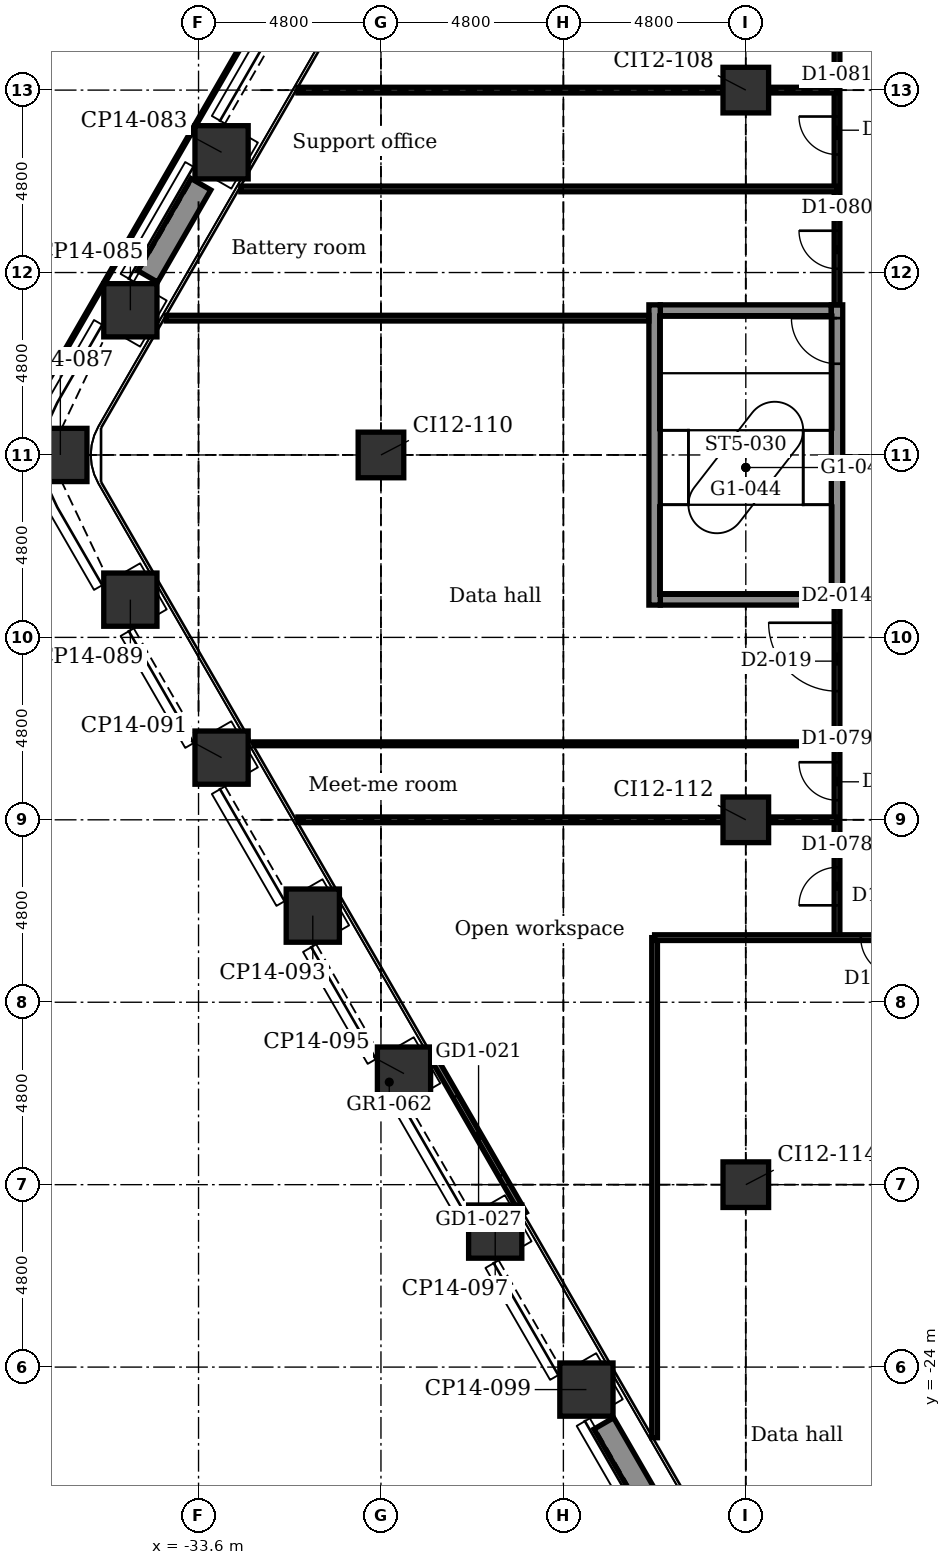
"""IFC4 building model, lengths in metres.
Left out: names, types, materials, properties, quantities, classifications, styles, units other than length and angle.
Written with IfcOpenShell. Run it as: python <this file> out.ifc"""

import sys

from ifc_helpers import new_model, si_unit, direction, frame, frame_2d, origin, origin_2d, place, context, subcontext, project, spatial, rectangle, extrude, element, fill, save


model = new_model("IFC4")
c1 = context("Model", 3, precision=1e-05, world=origin(), true_north=direction((0.0, 1.0)))
c2 = subcontext(c1, "Body", "Model", "MODEL_VIEW")
j1 = project(units=[si_unit("LENGTHUNIT", "METRE"), si_unit("PLANEANGLEUNIT", "RADIAN")], contexts=[c1])
p1 = place(None, origin())
s1 = spatial("IfcSite", under=j1, at=p1, CompositionType="ELEMENT")
p2 = place(p1, origin())
s2 = spatial("IfcBuilding", under=s1, at=p2, CompositionType="ELEMENT")
p3 = place(p2, frame((0.0, 0.0, 22.4)))
s3 = spatial("IfcBuildingStorey", under=s2, at=p3, CompositionType="ELEMENT", Elevation=22.4)
for number, where, z_axis, x_axis in (
    (1, (-23.394, -24.592, -0.25), (0.0, 0.0, 1.0), (0.866, 0.5, 0.0)),
    (2, (-25.794, -20.435, -0.25), (0.0, 0.0, 1.0), (0.866, 0.5, 0.0)),
    (3, (-28.194, -16.278, -0.25), (0.0, 0.0, 1.0), (0.866, 0.5, 0.0)),
    (4, (-30.594, -12.121, -0.25), (0.0, 0.0, 1.0), (0.866, 0.5, 0.0)),
    (5, (-32.994, -7.964, -0.25), (0.0, 0.0, 1.0), (0.866, 0.5, 0.0)),
    (6, (-35.394, -3.807, -0.25), (0.0, 0.0, 1.0), (0.866, 0.5, 0.0)),
    (7, (-37.236, 0.0, -0.25), (0.0, 0.0, 1.0), (1.0, 0.0, 0.0)),
    (8, (-35.394, 3.807, -0.25), (0.0, 0.0, 1.0), (0.5, 0.866, 0.0)),
    (9, (-32.994, 7.964, -0.25), (0.0, 0.0, 1.0), (0.5, 0.866, 0.0)),
):
    element("IfcColumn", number, at=place(p3, frame(where, z_axis=z_axis, x_axis=x_axis)), inside=s3, PredefinedType="COLUMN", context=c2, shape_type="SweptSolid", body=[
        extrude(rectangle(XDim=1.4, YDim=1.4, at=origin_2d()), origin(), (0.0, 0.0, 1.0), 5.5),
    ])
for number, where, z_axis, x_axis in (
    (10, (-28.8, 0.0, -0.25), (0.0, 0.0, 1.0), (1.0, 0.0, 0.0)),
    (11, (-19.2, -19.2, -0.25), (0.0, 0.0, 1.0), (1.0, 0.0, 0.0)),
    (12, (-19.2, -9.6, -0.25), (0.0, 0.0, 1.0), (1.0, 0.0, 0.0)),
    (13, (-19.2, 9.6, -0.25), (0.0, 0.0, 1.0), (1.0, 0.0, 0.0)),
):
    element("IfcColumn", number, at=place(p3, frame(where, z_axis=z_axis, x_axis=x_axis)), inside=s3, PredefinedType="COLUMN", context=c2, shape_type="SweptSolid", body=[
        extrude(rectangle(XDim=1.2, YDim=1.2, at=origin_2d()), origin(), (0.0, 0.0, 1.0), 5.5),
    ])
for number, where, z_axis, x_axis in (
    (14, (-21.45, -3.8, -0.25), (0.0, 0.0, 1.0), (1.0, 0.0, 0.0)),
    (15, (-21.45, 3.8, -0.25), (0.0, 0.0, 1.0), (1.0, 0.0, 0.0)),
):
    element("IfcWall", number, at=place(p3, frame(where, z_axis=z_axis, x_axis=x_axis)), inside=s3, PredefinedType="STANDARD", context=c2, shape_type="SweptSolid", body=[
        extrude(rectangle(XDim=4.5, YDim=0.3, at=frame_2d((2.25, 0.0))), origin(), (0.0, 0.0, 1.0), 5.5),
    ])
p4 = place(p3, frame((-21.6, -3.95, -0.25), z_axis=(0.0, 0.0, 1.0), x_axis=(0.0, 1.0, 0.0)))
e16 = element("IfcWall", 16, at=p4, inside=s3, PredefinedType="STANDARD", context=c2, shape_type="SweptSolid", body=[
    extrude(rectangle(XDim=7.9, YDim=0.3, at=frame_2d((3.95, 0.0))), origin(), (0.0, 0.0, 1.0), 5.5),
])
p5 = place(p3, frame((-16.8, -3.95, -0.25), z_axis=(0.0, 0.0, 1.0), x_axis=(0.0, 1.0, 0.0)))
e17 = element("IfcWall", 17, at=p5, inside=s3, PredefinedType="STANDARD", context=c2, shape_type="SweptSolid", body=[
    extrude(rectangle(XDim=7.9, YDim=0.3, at=frame_2d((3.95, 0.0))), origin(), (0.0, 0.0, 1.0), 5.5),
])
p6 = place(p5, frame((6.35, 0.0, 0.25)))
e18 = element("IfcOpeningElement", 18, at=p6, cuts=e17, PredefinedType="OPENING", context=c2, shape_type="SweptSolid", body=[
    extrude(rectangle(XDim=1.2, YDim=2.1, at=frame_2d((0.6, 1.05))), frame((0.0, 0.16, 0.0), z_axis=(0.0, -1.0, 0.0), x_axis=(1.0, 0.0, 0.0)), (0.0, 0.0, 1.0), 0.32),
])
p7 = place(p3, frame((-25.047, -19.969, 0.0), z_axis=(0.0, 0.0, 1.0), x_axis=(-0.5000167099, 0.866015756104, 0.0)))
e19 = element("IfcWall", 19, at=p7, inside=s3, PredefinedType="PARTITIONING", context=c2, shape_type="SweptSolid", body=[
    extrude(rectangle(XDim=4.74, YDim=0.16, at=frame_2d((2.37, 0.0))), origin(), (0.0, 0.0, 1.0), 5.25),
])
p8 = place(p7, frame((1.17, 0.0, 0.0)))
e20 = element("IfcOpeningElement", 20, at=p8, cuts=e19, PredefinedType="OPENING", context=c2, shape_type="SweptSolid", body=[
    extrude(rectangle(XDim=2.4, YDim=2.4, at=frame_2d((1.2, 1.2))), frame((0.0, 0.09, 0.0), z_axis=(0.0, -1.0, 0.0), x_axis=(1.0, 0.0, 0.0)), (0.0, 0.0, 1.0), 0.18),
])
for number, where, z_axis, x_axis in (
    (21, (-21.537, -27.907, 0.0), (0.0, 0.0, 1.0), (-0.5, 0.866, 0.0)),
    (22, (-34.937, 4.698, 0.0), (0.0, 0.0, 1.0), (0.5, 0.866, 0.0)),
):
    element("IfcWall", number, at=place(p3, frame(where, z_axis=z_axis, x_axis=x_axis)), inside=s3, PredefinedType="USERDEFINED", context=c2, shape_type="SweptSolid", body=[
        extrude(rectangle(XDim=2.8, YDim=0.6, at=frame_2d((1.4, 0.0))), origin(), (0.0, 0.0, 1.0), 0.7),
    ])
p9 = place(p3, frame((-16.8, -12.7, 0.0), z_axis=(0.0, 0.0, 1.0), x_axis=(0.0, 1.0, 0.0)))
e23 = element("IfcWall", 23, at=p9, inside=s3, PredefinedType="PARTITIONING", context=c2, shape_type="SweptSolid", body=[
    extrude(rectangle(XDim=8.75, YDim=0.15, at=frame_2d((4.375, 0.0))), origin(), (0.0, 0.0, 1.0), 5.25),
])
p10 = place(p9, frame((0.85, 0.0, 0.0)))
e24 = element("IfcOpeningElement", 24, at=p10, cuts=e23, PredefinedType="OPENING", context=c2, shape_type="SweptSolid", body=[
    extrude(rectangle(XDim=1.0, YDim=2.1, at=frame_2d((0.5, 1.05))), frame((0.0, 0.085, 0.0), z_axis=(0.0, -1.0, 0.0), x_axis=(1.0, 0.0, 0.0)), (0.0, 0.0, 1.0), 0.17),
])
p11 = place(p9, frame((3.615, 0.0, 0.0)))
e25 = element("IfcOpeningElement", 25, at=p11, cuts=e23, PredefinedType="OPENING", context=c2, shape_type="SweptSolid", body=[
    extrude(rectangle(XDim=1.0, YDim=2.1, at=frame_2d((0.5, 1.05))), frame((0.0, 0.085, 0.0), z_axis=(0.0, -1.0, 0.0), x_axis=(1.0, 0.0, 0.0)), (0.0, 0.0, 1.0), 0.17),
])
p12 = place(p9, frame((6.485, 0.0, 0.0)))
e26 = element("IfcOpeningElement", 26, at=p12, cuts=e23, PredefinedType="OPENING", context=c2, shape_type="SweptSolid", body=[
    extrude(rectangle(XDim=1.8, YDim=2.1, at=frame_2d((0.9, 1.05))), frame((0.0, 0.085, 0.0), z_axis=(0.0, -1.0, 0.0), x_axis=(1.0, 0.0, 0.0)), (0.0, 0.0, 1.0), 0.17),
])
p13 = place(p3, frame((-16.8, 3.95, 0.0), z_axis=(0.0, 0.0, 1.0), x_axis=(0.0, 1.0, 0.0)))
e27 = element("IfcWall", 27, at=p13, inside=s3, PredefinedType="PARTITIONING", context=c2, shape_type="SweptSolid", body=[
    extrude(rectangle(XDim=9.05, YDim=0.15, at=frame_2d((4.525, 0.0))), origin(), (0.0, 0.0, 1.0), 5.25),
])
p14 = place(p13, frame((0.95, 0.0, 0.0)))
e28 = element("IfcOpeningElement", 28, at=p14, cuts=e27, PredefinedType="OPENING", context=c2, shape_type="SweptSolid", body=[
    extrude(rectangle(XDim=1.0, YDim=2.1, at=frame_2d((0.5, 1.05))), frame((0.0, 0.085, 0.0), z_axis=(0.0, -1.0, 0.0), x_axis=(1.0, 0.0, 0.0)), (0.0, 0.0, 1.0), 0.17),
])
p15 = place(p13, frame((3.955, 0.0, 0.0)))
e29 = element("IfcOpeningElement", 29, at=p15, cuts=e27, PredefinedType="OPENING", context=c2, shape_type="SweptSolid", body=[
    extrude(rectangle(XDim=1.0, YDim=2.1, at=frame_2d((0.5, 1.05))), frame((0.0, 0.085, 0.0), z_axis=(0.0, -1.0, 0.0), x_axis=(1.0, 0.0, 0.0)), (0.0, 0.0, 1.0), 0.17),
])
p16 = place(p13, frame((7.05, 0.0, 0.0)))
e30 = element("IfcOpeningElement", 30, at=p16, cuts=e27, PredefinedType="OPENING", context=c2, shape_type="SweptSolid", body=[
    extrude(rectangle(XDim=1.0, YDim=2.1, at=frame_2d((0.5, 1.05))), frame((0.0, 0.085, 0.0), z_axis=(0.0, -1.0, 0.0), x_axis=(1.0, 0.0, 0.0)), (0.0, 0.0, 1.0), 0.17),
])
p17 = place(p3, frame((-21.6, -25.858, 0.0), z_axis=(0.0, 0.0, 1.0), x_axis=(0.0, 1.0, 0.0)))
e31 = element("IfcWall", 31, at=p17, inside=s3, PredefinedType="PARTITIONING", context=c2, shape_type="SweptSolid", body=[
    extrude(rectangle(XDim=13.158, YDim=0.15, at=frame_2d((6.579, 0.0))), origin(), (0.0, 0.0, 1.0), 5.25),
])
p18 = place(p3, frame((-21.6, -12.7, 0.0), z_axis=(0.0, 0.0, 1.0), x_axis=(1.0, 0.0, 0.0)))
e32 = element("IfcWall", 32, at=p18, inside=s3, PredefinedType="PARTITIONING", context=c2, shape_type="SweptSolid", body=[
    extrude(rectangle(XDim=38.4, YDim=0.15, at=frame_2d((19.2, 0.0))), origin(), (0.0, 0.0, 1.0), 5.25),
])
p19 = place(p18, frame((5.425, 0.0, 0.0)))
e33 = element("IfcOpeningElement", 33, at=p19, cuts=e32, PredefinedType="OPENING", context=c2, shape_type="SweptSolid", body=[
    extrude(rectangle(XDim=1.0, YDim=2.1, at=frame_2d((0.5, 1.05))), frame((0.0, 0.085, 0.0), z_axis=(0.0, -1.0, 0.0), x_axis=(1.0, 0.0, 0.0)), (0.0, 0.0, 1.0), 0.17),
])
p20 = place(p18, frame((9.1, 0.0, 0.0)))
e34 = element("IfcOpeningElement", 34, at=p20, cuts=e32, PredefinedType="OPENING", context=c2, shape_type="SweptSolid", body=[
    extrude(rectangle(XDim=1.0, YDim=2.1, at=frame_2d((0.5, 1.05))), frame((0.0, 0.085, 0.0), z_axis=(0.0, -1.0, 0.0), x_axis=(1.0, 0.0, 0.0)), (0.0, 0.0, 1.0), 0.17),
])
p21 = place(p18, frame((15.9, 0.0, 0.0)))
e35 = element("IfcOpeningElement", 35, at=p21, cuts=e32, PredefinedType="OPENING", context=c2, shape_type="SweptSolid", body=[
    extrude(rectangle(XDim=1.8, YDim=2.1, at=frame_2d((0.9, 1.05))), frame((0.0, 0.085, 0.0), z_axis=(0.0, -1.0, 0.0), x_axis=(1.0, 0.0, 0.0)), (0.0, 0.0, 1.0), 0.17),
])
p22 = place(p18, frame((27.915, 0.0, 0.0)))
e36 = element("IfcOpeningElement", 36, at=p22, cuts=e32, PredefinedType="OPENING", context=c2, shape_type="SweptSolid", body=[
    extrude(rectangle(XDim=1.8, YDim=2.1, at=frame_2d((0.9, 1.05))), frame((0.0, 0.085, 0.0), z_axis=(0.0, -1.0, 0.0), x_axis=(1.0, 0.0, 0.0)), (0.0, 0.0, 1.0), 0.17),
])
p23 = place(p18, frame((35.025, 0.0, 0.0)))
e37 = element("IfcOpeningElement", 37, at=p23, cuts=e32, PredefinedType="OPENING", context=c2, shape_type="SweptSolid", body=[
    extrude(rectangle(XDim=1.8, YDim=2.1, at=frame_2d((0.9, 1.05))), frame((0.0, 0.085, 0.0), z_axis=(0.0, -1.0, 0.0), x_axis=(1.0, 0.0, 0.0)), (0.0, 0.0, 1.0), 0.17),
])
p24 = place(p18, frame((13.0, 0.0, 0.9)))
e38 = element("IfcOpeningElement", 38, at=p24, cuts=e32, PredefinedType="OPENING", context=c2, shape_type="SweptSolid", body=[
    extrude(rectangle(XDim=1.8, YDim=1.5, at=frame_2d((0.9, 0.75))), frame((0.0, 0.085, 0.0), z_axis=(0.0, -1.0, 0.0), x_axis=(1.0, 0.0, 0.0)), (0.0, 0.0, 1.0), 0.17),
])
p25 = place(p3, frame((-30.987, -9.6, 0.0), z_axis=(0.0, 0.0, 1.0), x_axis=(1.0, 0.0, 0.0)))
e39 = element("IfcWall", 39, at=p25, inside=s3, PredefinedType="PARTITIONING", context=c2, shape_type="SweptSolid", body=[
    extrude(rectangle(XDim=11.187, YDim=0.15, at=frame_2d((5.593, 0.0))), origin(), (0.0, 0.0, 1.0), 4.488),
])
p26 = place(p3, frame((-18.6, -9.6, 0.0), z_axis=(0.0, 0.0, 1.0), x_axis=(1.0, 0.0, 0.0)))
e40 = element("IfcWall", 40, at=p26, inside=s3, PredefinedType="PARTITIONING", context=c2, shape_type="SweptSolid", body=[
    extrude(rectangle(XDim=1.8, YDim=0.15, at=frame_2d((0.9, 0.0))), origin(), (0.0, 0.0, 1.0), 4.642),
])
p27 = place(p3, frame((-32.142, -7.6, 0.0), z_axis=(0.0, 0.0, 1.0), x_axis=(1.0, 0.0, 0.0)))
e41 = element("IfcWall", 41, at=p27, inside=s3, PredefinedType="PARTITIONING", context=c2, shape_type="SweptSolid", body=[
    extrude(rectangle(XDim=15.342, YDim=0.1, at=frame_2d((7.671, 0.0))), origin(), (0.0, 0.0, 1.0), 5.25),
])
p28 = place(p3, frame((-34.451, 3.6, 0.0), z_axis=(0.0, 0.0, 1.0), x_axis=(1.0, 0.0, 0.0)))
e42 = element("IfcWall", 42, at=p28, inside=s3, PredefinedType="PARTITIONING", context=c2, shape_type="SweptSolid", body=[
    extrude(rectangle(XDim=12.701, YDim=0.15, at=frame_2d((6.351, 0.0))), origin(), (0.0, 0.0, 1.0), 5.25),
])
p29 = place(p3, frame((-32.488, 7.0, 0.0), z_axis=(0.0, 0.0, 1.0), x_axis=(1.0, 0.0, 0.0)))
e43 = element("IfcWall", 43, at=p29, inside=s3, PredefinedType="PARTITIONING", context=c2, shape_type="SweptSolid", body=[
    extrude(rectangle(XDim=15.688, YDim=0.15, at=frame_2d((7.844, 0.0))), origin(), (0.0, 0.0, 1.0), 5.25),
])
p30 = place(p3, frame((-30.987, 9.6, 0.0), z_axis=(0.0, 0.0, 1.0), x_axis=(1.0, 0.0, 0.0)))
e44 = element("IfcWall", 44, at=p30, inside=s3, PredefinedType="PARTITIONING", context=c2, shape_type="SweptSolid", body=[
    extrude(rectangle(XDim=11.187, YDim=0.15, at=frame_2d((5.593, 0.0))), origin(), (0.0, 0.0, 1.0), 4.488),
])
p31 = place(p3, frame((-18.6, 9.6, 0.0), z_axis=(0.0, 0.0, 1.0), x_axis=(1.0, 0.0, 0.0)))
e45 = element("IfcWall", 45, at=p31, inside=s3, PredefinedType="PARTITIONING", context=c2, shape_type="SweptSolid", body=[
    extrude(rectangle(XDim=1.8, YDim=0.15, at=frame_2d((0.9, 0.0))), origin(), (0.0, 0.0, 1.0), 4.642),
])
p32 = place(p8, origin())
e46 = element("IfcDoor", 46, at=p32, inside=s3, OperationType="DOUBLE_DOOR_SLIDING", PredefinedType="DOOR", context=c2, shape_type="SweptSolid", body=[
    extrude(rectangle(XDim=2.4, YDim=2.4, at=frame_2d((1.2, 1.2))), frame((0.0, 0.025, 0.0), z_axis=(0.0, -1.0, 0.0), x_axis=(1.0, 0.0, 0.0)), (0.0, 0.0, 1.0), 0.05),
])
fill(e20, e46)
p33 = place(p19, frame((1.0, 0.0, 0.0), z_axis=(0.0, 0.0, 1.0), x_axis=(-1.0, 0.0, 0.0)))
e47 = element("IfcDoor", 47, at=p33, inside=s3, OperationType="SINGLE_SWING_RIGHT", PredefinedType="DOOR", context=c2, shape_type="SweptSolid", body=[
    extrude(rectangle(XDim=1.0, YDim=2.1, at=frame_2d((0.5, 1.05))), frame((0.0, 0.025, 0.0), z_axis=(0.0, -1.0, 0.0), x_axis=(1.0, 0.0, 0.0)), (0.0, 0.0, 1.0), 0.05),
])
fill(e33, e47)
p34 = place(p10, origin())
e48 = element("IfcDoor", 48, at=p34, inside=s3, OperationType="SINGLE_SWING_LEFT", PredefinedType="DOOR", context=c2, shape_type="SweptSolid", body=[
    extrude(rectangle(XDim=1.0, YDim=2.1, at=frame_2d((0.5, 1.05))), frame((0.0, 0.025, 0.0), z_axis=(0.0, -1.0, 0.0), x_axis=(1.0, 0.0, 0.0)), (0.0, 0.0, 1.0), 0.05),
])
fill(e24, e48)
p35 = place(p11, origin())
e49 = element("IfcDoor", 49, at=p35, inside=s3, OperationType="SINGLE_SWING_RIGHT", PredefinedType="DOOR", context=c2, shape_type="SweptSolid", body=[
    extrude(rectangle(XDim=1.0, YDim=2.1, at=frame_2d((0.5, 1.05))), frame((0.0, 0.025, 0.0), z_axis=(0.0, -1.0, 0.0), x_axis=(1.0, 0.0, 0.0)), (0.0, 0.0, 1.0), 0.05),
])
fill(e25, e49)
p36 = place(p12, origin())
e50 = element("IfcDoor", 50, at=p36, inside=s3, OperationType="SINGLE_SWING_RIGHT", PredefinedType="DOOR", context=c2, shape_type="SweptSolid", body=[
    extrude(rectangle(XDim=1.8, YDim=2.1, at=frame_2d((0.9, 1.05))), frame((0.0, 0.025, 0.0), z_axis=(0.0, -1.0, 0.0), x_axis=(1.0, 0.0, 0.0)), (0.0, 0.0, 1.0), 0.05),
])
fill(e26, e50)
p37 = place(p14, origin())
e51 = element("IfcDoor", 51, at=p37, inside=s3, OperationType="SINGLE_SWING_RIGHT", PredefinedType="DOOR", context=c2, shape_type="SweptSolid", body=[
    extrude(rectangle(XDim=1.0, YDim=2.1, at=frame_2d((0.5, 1.05))), frame((0.0, 0.025, 0.0), z_axis=(0.0, -1.0, 0.0), x_axis=(1.0, 0.0, 0.0)), (0.0, 0.0, 1.0), 0.05),
])
fill(e28, e51)
p38 = place(p15, origin())
e52 = element("IfcDoor", 52, at=p38, inside=s3, OperationType="SINGLE_SWING_RIGHT", PredefinedType="DOOR", context=c2, shape_type="SweptSolid", body=[
    extrude(rectangle(XDim=1.0, YDim=2.1, at=frame_2d((0.5, 1.05))), frame((0.0, 0.025, 0.0), z_axis=(0.0, -1.0, 0.0), x_axis=(1.0, 0.0, 0.0)), (0.0, 0.0, 1.0), 0.05),
])
fill(e29, e52)
p39 = place(p6, origin())
e53 = element("IfcDoor", 53, at=p39, inside=s3, OperationType="SINGLE_SWING_RIGHT", PredefinedType="DOOR", context=c2, shape_type="SweptSolid", body=[
    extrude(rectangle(XDim=1.2, YDim=2.1, at=frame_2d((0.6, 1.05))), frame((0.0, 0.025, 0.0), z_axis=(0.0, -1.0, 0.0), x_axis=(1.0, 0.0, 0.0)), (0.0, 0.0, 1.0), 0.05),
])
fill(e18, e53)
save(model, sys.argv[1])
